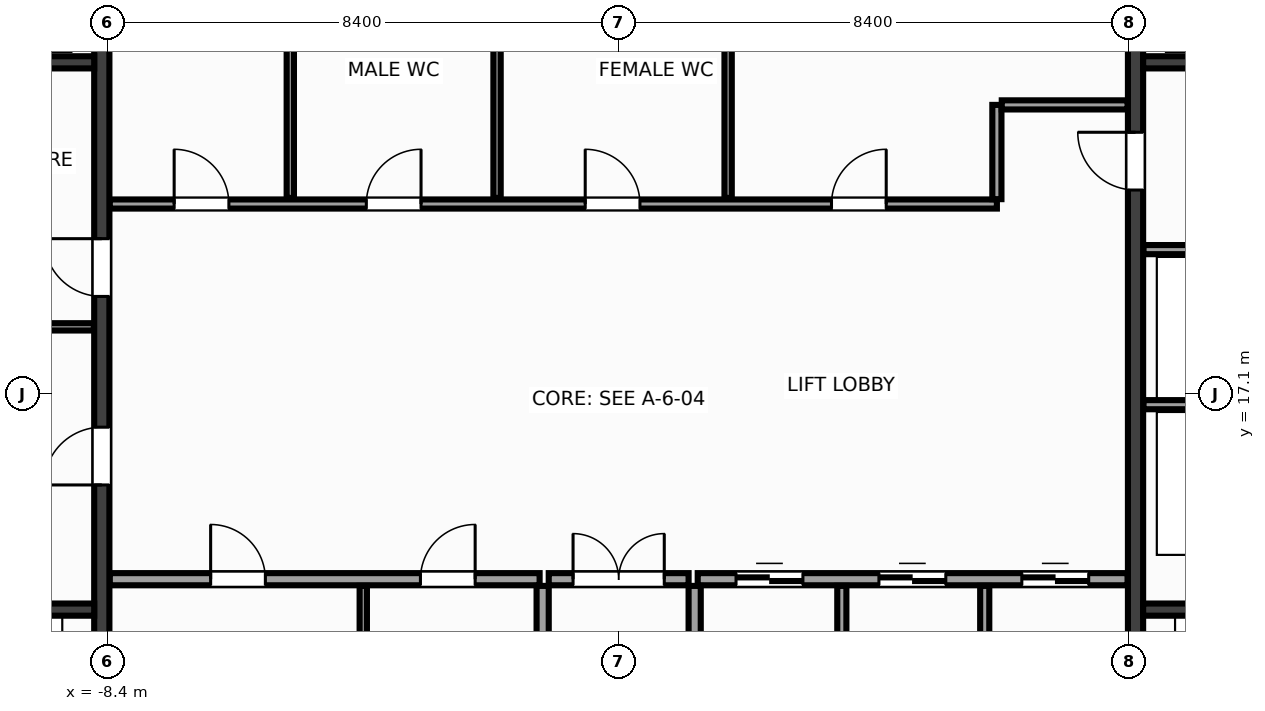
"""IFC4 building model, lengths in metres.
Left out: names, types, materials, properties, quantities, classifications, styles, units other than length and angle.
Written with IfcOpenShell. Run it as: python <this file> out.ifc"""

import sys

from ifc_helpers import new_model, si_unit, direction, frame, frame_2d, origin, place, context, subcontext, project, spatial, rectangle, extrude, source, transform, mapped, element, fill, save


model = new_model("IFC4")
c1 = context("Model", 3, precision=1e-05, world=origin(), true_north=direction((0.0, 1.0)))
c2 = subcontext(c1, "Body", "Model", "MODEL_VIEW")
j1 = project(units=[si_unit("LENGTHUNIT", "METRE"), si_unit("PLANEANGLEUNIT", "RADIAN")], contexts=[c1])
p1 = place(None, origin())
s1 = spatial("IfcSite", under=j1, at=p1, CompositionType="ELEMENT")
p2 = place(p1, origin())
s2 = spatial("IfcBuilding", under=s1, at=p2, CompositionType="ELEMENT")
p3 = place(p2, frame((0.0, 0.0, 113.6)))
s3 = spatial("IfcBuildingStorey", under=s2, at=p3, CompositionType="ELEMENT", Elevation=113.6)
m1 = source(origin(), c2, "Body", "SweptSolid", [
    extrude(rectangle(XDim=12.95, YDim=0.25, at=frame_2d((6.475, 0.0))), origin(), (0.0, 0.0, 1.0), 3.6),
])
p4 = place(p3, frame((-8.5, 10.525, 0.0), z_axis=(0.0, 0.0, 1.0), x_axis=(0.0, 1.0, 0.0)))
e1 = element("IfcWall", 1, at=p4, inside=s3, PredefinedType="SHEAR", context=c2, shape_type="MappedRepresentation", body=[
    mapped(m1, transform((0.0, 0.0, 0.0), x_axis=(1.0, 0.0, 0.0), y_axis=(0.0, 1.0, 0.0), z_axis=(0.0, 0.0, 1.0), scale=1.0)),
])
p5 = place(p4, frame((5.075, 0.0, 0.0)))
e2 = element("IfcOpeningElement", 2, at=p5, cuts=e1, PredefinedType="OPENING", context=c2, shape_type="SweptSolid", body=[
    extrude(rectangle(XDim=0.95, YDim=2.15, at=frame_2d((0.475, 1.075))), frame((0.0, 0.137, 0.0), z_axis=(0.0, -1.0, 0.0), x_axis=(1.0, 0.0, 0.0)), (0.0, 0.0, 1.0), 0.274),
])
p6 = place(p4, frame((8.175, 0.0, 0.0)))
e3 = element("IfcOpeningElement", 3, at=p6, cuts=e1, PredefinedType="OPENING", context=c2, shape_type="SweptSolid", body=[
    extrude(rectangle(XDim=0.95, YDim=2.15, at=frame_2d((0.475, 1.075))), frame((0.0, 0.137, 0.0), z_axis=(0.0, -1.0, 0.0), x_axis=(1.0, 0.0, 0.0)), (0.0, 0.0, 1.0), 0.274),
])
p7 = place(p3, frame((8.5, 10.525, 0.0), z_axis=(0.0, 0.0, 1.0), x_axis=(0.0, 1.0, 0.0)))
e4 = element("IfcWall", 4, at=p7, inside=s3, PredefinedType="SHEAR", context=c2, shape_type="MappedRepresentation", body=[
    mapped(m1, transform((0.0, 0.0, 0.0), x_axis=(1.0, 0.0, 0.0), y_axis=(0.0, 1.0, 0.0), z_axis=(0.0, 0.0, 1.0), scale=1.0)),
])
p8 = place(p7, frame((9.925, 0.0, 0.0)))
e5 = element("IfcOpeningElement", 5, at=p8, cuts=e4, PredefinedType="OPENING", context=c2, shape_type="SweptSolid", body=[
    extrude(rectangle(XDim=0.95, YDim=2.15, at=frame_2d((0.475, 1.075))), frame((0.0, 0.137, 0.0), z_axis=(0.0, -1.0, 0.0), x_axis=(1.0, 0.0, 0.0)), (0.0, 0.0, 1.0), 0.274),
])
m2 = source(origin(), c2, "Body", "SweptSolid", [
    extrude(rectangle(XDim=2.825, YDim=0.2, at=frame_2d((1.413, 0.0))), origin(), (0.0, 0.0, 1.0), 3.6),
])
for number, where, z_axis, x_axis in (
    (6, (-11.45, 13.55, 0.0), (0.0, 0.0, 1.0), (1.0, 0.0, 0.0)),
    (7, (8.625, 13.55, 0.0), (0.0, 0.0, 1.0), (1.0, 0.0, 0.0)),
):
    element("IfcWall", number, at=place(p3, frame(where, z_axis=z_axis, x_axis=x_axis)), inside=s3, PredefinedType="SHEAR", context=c2, shape_type="MappedRepresentation", body=[
        mapped(m2, transform((0.0, 0.0, 0.0), x_axis=(1.0, 0.0, 0.0), y_axis=(0.0, 1.0, 0.0), z_axis=(0.0, 0.0, 1.0), scale=1.0)),
    ])
m3 = source(origin(), c2, "Body", "SweptSolid", [
    extrude(rectangle(XDim=3.02, YDim=0.2, at=frame_2d((1.51, 0.0))), origin(), (0.0, 0.0, 1.0), 3.6),
])
for number, where, z_axis, x_axis in (
    (8, (-11.645, 22.55, 0.0), (0.0, 0.0, 1.0), (1.0, 0.0, 0.0)),
    (9, (8.625, 22.55, 0.0), (0.0, 0.0, 1.0), (1.0, 0.0, 0.0)),
):
    element("IfcWall", number, at=place(p3, frame(where, z_axis=z_axis, x_axis=x_axis)), inside=s3, PredefinedType="SHEAR", context=c2, shape_type="MappedRepresentation", body=[
        mapped(m3, transform((0.0, 0.0, 0.0), x_axis=(1.0, 0.0, 0.0), y_axis=(0.0, 1.0, 0.0), z_axis=(0.0, 0.0, 1.0), scale=1.0)),
    ])
m4 = source(origin(), c2, "Body", "SweptSolid", [
    extrude(rectangle(XDim=3.01, YDim=0.12, at=frame_2d((1.505, 0.0))), origin(), (0.0, 0.0, 1.0), 3.36),
])
p9 = place(p3, frame((-11.64, 18.2, 0.0), z_axis=(0.0, 0.0, 1.0), x_axis=(1.0, 0.0, 0.0)))
e10 = element("IfcWall", 10, at=p9, inside=s3, PredefinedType="PARTITIONING", context=c2, shape_type="MappedRepresentation", body=[
    mapped(m4, transform((0.0, 0.0, 0.0), x_axis=(1.0, 0.0, 0.0), y_axis=(0.0, 1.0, 0.0), z_axis=(0.0, 0.0, 1.0), scale=1.0)),
])
m5 = source(origin(), c2, "Body", "SweptSolid", [
    extrude(rectangle(XDim=3.01, YDim=0.15, at=frame_2d((1.505, 0.0))), origin(), (0.0, 0.0, 1.0), 3.36),
])
for number, where, z_axis, x_axis in (
    (11, (8.63, 16.92, 0.0), (0.0, 0.0, 1.0), (1.0, 0.0, 0.0)),
    (12, (8.63, 19.47, 0.0), (0.0, 0.0, 1.0), (1.0, 0.0, 0.0)),
):
    element("IfcWall", number, at=place(p3, frame(where, z_axis=z_axis, x_axis=x_axis)), inside=s3, PredefinedType="PARTITIONING", context=c2, shape_type="MappedRepresentation", body=[
        mapped(m5, transform((0.0, 0.0, 0.0), x_axis=(1.0, 0.0, 0.0), y_axis=(0.0, 1.0, 0.0), z_axis=(0.0, 0.0, 1.0), scale=1.0)),
    ])
m6 = source(origin(), c2, "Body", "SweptSolid", [
    extrude(rectangle(XDim=7.07, YDim=0.2, at=frame_2d((3.535, 0.0))), origin(), (0.0, 0.0, 1.0), 3.36),
])
p10 = place(p3, frame((-8.37, 14.05, 0.0), z_axis=(0.0, 0.0, 1.0), x_axis=(1.0, 0.0, 0.0)))
e13 = element("IfcWall", 13, at=p10, inside=s3, PredefinedType="PARTITIONING", context=c2, shape_type="MappedRepresentation", body=[
    mapped(m6, transform((0.0, 0.0, 0.0), x_axis=(1.0, 0.0, 0.0), y_axis=(0.0, 1.0, 0.0), z_axis=(0.0, 0.0, 1.0), scale=1.0)),
])
p11 = place(p10, frame((1.66, 0.0, 0.0)))
e14 = element("IfcOpeningElement", 14, at=p11, cuts=e13, PredefinedType="OPENING", context=c2, shape_type="SweptSolid", body=[
    extrude(rectangle(XDim=0.9, YDim=2.15, at=frame_2d((0.45, 1.075))), frame((0.0, 0.112, 0.0), z_axis=(0.0, -1.0, 0.0), x_axis=(1.0, 0.0, 0.0)), (0.0, 0.0, 1.0), 0.224),
])
p12 = place(p10, frame((5.11, 0.0, 0.0)))
e15 = element("IfcOpeningElement", 15, at=p12, cuts=e13, PredefinedType="OPENING", context=c2, shape_type="SweptSolid", body=[
    extrude(rectangle(XDim=0.9, YDim=2.15, at=frame_2d((0.45, 1.075))), frame((0.0, 0.112, 0.0), z_axis=(0.0, -1.0, 0.0), x_axis=(1.0, 0.0, 0.0)), (0.0, 0.0, 1.0), 0.224),
])
p13 = place(p3, frame((1.3, 14.05, 0.0), z_axis=(0.0, 0.0, 1.0), x_axis=(1.0, 0.0, 0.0)))
e16 = element("IfcWall", 16, at=p13, inside=s3, PredefinedType="PARTITIONING", context=c2, shape_type="MappedRepresentation", body=[
    mapped(m6, transform((0.0, 0.0, 0.0), x_axis=(1.0, 0.0, 0.0), y_axis=(0.0, 1.0, 0.0), z_axis=(0.0, 0.0, 1.0), scale=1.0)),
])
p14 = place(p13, frame((0.63, 0.0, 0.0)))
e17 = element("IfcOpeningElement", 17, at=p14, cuts=e16, PredefinedType="OPENING", context=c2, shape_type="SweptSolid", body=[
    extrude(rectangle(XDim=1.1, YDim=2.15, at=frame_2d((0.55, 1.075))), frame((0.0, 0.112, 0.0), z_axis=(0.0, -1.0, 0.0), x_axis=(1.0, 0.0, 0.0)), (0.0, 0.0, 1.0), 0.224),
])
p15 = place(p13, frame((2.98, 0.0, 0.0)))
e18 = element("IfcOpeningElement", 18, at=p15, cuts=e16, PredefinedType="OPENING", context=c2, shape_type="SweptSolid", body=[
    extrude(rectangle(XDim=1.1, YDim=2.15, at=frame_2d((0.55, 1.075))), frame((0.0, 0.112, 0.0), z_axis=(0.0, -1.0, 0.0), x_axis=(1.0, 0.0, 0.0)), (0.0, 0.0, 1.0), 0.224),
])
p16 = place(p13, frame((5.33, 0.0, 0.0)))
e19 = element("IfcOpeningElement", 19, at=p16, cuts=e16, PredefinedType="OPENING", context=c2, shape_type="SweptSolid", body=[
    extrude(rectangle(XDim=1.1, YDim=2.15, at=frame_2d((0.55, 1.075))), frame((0.0, 0.112, 0.0), z_axis=(0.0, -1.0, 0.0), x_axis=(1.0, 0.0, 0.0)), (0.0, 0.0, 1.0), 0.224),
])
m7 = source(origin(), c2, "Body", "SweptSolid", [
    extrude(rectangle(XDim=3.415, YDim=0.2, at=frame_2d((1.708, 0.0))), origin(), (0.0, 0.0, 1.0), 3.36),
])
for number, where, z_axis, x_axis in (
    (20, (-1.25, 10.525, 0.0), (0.0, 0.0, 1.0), (0.0, 1.0, 0.0)),
    (21, (1.25, 10.525, 0.0), (0.0, 0.0, 1.0), (0.0, 1.0, 0.0)),
):
    element("IfcWall", number, at=place(p3, frame(where, z_axis=z_axis, x_axis=x_axis)), inside=s3, PredefinedType="PARTITIONING", context=c2, shape_type="MappedRepresentation", body=[
        mapped(m7, transform((0.0, 0.0, 0.0), x_axis=(1.0, 0.0, 0.0), y_axis=(0.0, 1.0, 0.0), z_axis=(0.0, 0.0, 1.0), scale=1.0)),
    ])
m8 = source(origin(), c2, "Body", "SweptSolid", [
    extrude(rectangle(XDim=2.3, YDim=0.2, at=frame_2d((1.15, 0.0))), origin(), (0.0, 0.0, 1.0), 3.36),
])
p17 = place(p3, frame((-1.15, 14.05, 0.0), z_axis=(0.0, 0.0, 1.0), x_axis=(1.0, 0.0, 0.0)))
e22 = element("IfcWall", 22, at=p17, inside=s3, PredefinedType="PARTITIONING", context=c2, shape_type="MappedRepresentation", body=[
    mapped(m8, transform((0.0, 0.0, 0.0), x_axis=(1.0, 0.0, 0.0), y_axis=(0.0, 1.0, 0.0), z_axis=(0.0, 0.0, 1.0), scale=1.0)),
])
p18 = place(p17, frame((0.4, 0.0, 0.0)))
e23 = element("IfcOpeningElement", 23, at=p18, cuts=e22, PredefinedType="OPENING", context=c2, shape_type="SweptSolid", body=[
    extrude(rectangle(XDim=1.5, YDim=2.2, at=frame_2d((0.75, 1.1))), frame((0.0, 0.112, 0.0), z_axis=(0.0, -1.0, 0.0), x_axis=(1.0, 0.0, 0.0)), (0.0, 0.0, 1.0), 0.224),
])
m9 = source(origin(), c2, "Body", "SweptSolid", [
    extrude(rectangle(XDim=14.59, YDim=0.15, at=frame_2d((7.295, 0.0))), origin(), (0.0, 0.0, 1.0), 3.36),
])
p19 = place(p3, frame((-8.37, 20.22, 0.0), z_axis=(0.0, 0.0, 1.0), x_axis=(1.0, 0.0, 0.0)))
e24 = element("IfcWall", 24, at=p19, inside=s3, PredefinedType="PARTITIONING", context=c2, shape_type="MappedRepresentation", body=[
    mapped(m9, transform((0.0, 0.0, 0.0), x_axis=(1.0, 0.0, 0.0), y_axis=(0.0, 1.0, 0.0), z_axis=(0.0, 0.0, 1.0), scale=1.0)),
])
p20 = place(p19, frame((1.06, 0.0, 0.0)))
e25 = element("IfcOpeningElement", 25, at=p20, cuts=e24, PredefinedType="OPENING", context=c2, shape_type="SweptSolid", body=[
    extrude(rectangle(XDim=0.9, YDim=2.15, at=frame_2d((0.45, 1.075))), frame((0.0, 0.087, 0.0), z_axis=(0.0, -1.0, 0.0), x_axis=(1.0, 0.0, 0.0)), (0.0, 0.0, 1.0), 0.174),
])
p21 = place(p19, frame((4.22, 0.0, 0.0)))
e26 = element("IfcOpeningElement", 26, at=p21, cuts=e24, PredefinedType="OPENING", context=c2, shape_type="SweptSolid", body=[
    extrude(rectangle(XDim=0.9, YDim=2.15, at=frame_2d((0.45, 1.075))), frame((0.0, 0.087, 0.0), z_axis=(0.0, -1.0, 0.0), x_axis=(1.0, 0.0, 0.0)), (0.0, 0.0, 1.0), 0.174),
])
p22 = place(p19, frame((7.82, 0.0, 0.0)))
e27 = element("IfcOpeningElement", 27, at=p22, cuts=e24, PredefinedType="OPENING", context=c2, shape_type="SweptSolid", body=[
    extrude(rectangle(XDim=0.9, YDim=2.15, at=frame_2d((0.45, 1.075))), frame((0.0, 0.087, 0.0), z_axis=(0.0, -1.0, 0.0), x_axis=(1.0, 0.0, 0.0)), (0.0, 0.0, 1.0), 0.174),
])
p23 = place(p19, frame((11.87, 0.0, 0.0)))
e28 = element("IfcOpeningElement", 28, at=p23, cuts=e24, PredefinedType="OPENING", context=c2, shape_type="SweptSolid", body=[
    extrude(rectangle(XDim=0.9, YDim=2.15, at=frame_2d((0.45, 1.075))), frame((0.0, 0.087, 0.0), z_axis=(0.0, -1.0, 0.0), x_axis=(1.0, 0.0, 0.0)), (0.0, 0.0, 1.0), 0.174),
])
m10 = source(origin(), c2, "Body", "SweptSolid", [
    extrude(rectangle(XDim=1.55, YDim=0.15, at=frame_2d((0.775, 0.0))), origin(), (0.0, 0.0, 1.0), 3.36),
])
p24 = place(p3, frame((6.22, 20.3, 0.0), z_axis=(0.0, 0.0, 1.0), x_axis=(0.0, 1.0, 0.0)))
e29 = element("IfcWall", 29, at=p24, inside=s3, PredefinedType="PARTITIONING", context=c2, shape_type="MappedRepresentation", body=[
    mapped(m10, transform((0.0, 0.0, 0.0), x_axis=(1.0, 0.0, 0.0), y_axis=(0.0, 1.0, 0.0), z_axis=(0.0, 0.0, 1.0), scale=1.0)),
])
m11 = source(origin(), c2, "Body", "SweptSolid", [
    extrude(rectangle(XDim=2.07, YDim=0.15, at=frame_2d((1.035, 0.0))), origin(), (0.0, 0.0, 1.0), 3.36),
])
p25 = place(p3, frame((6.3, 21.85, 0.0), z_axis=(0.0, 0.0, 1.0), x_axis=(1.0, 0.0, 0.0)))
e30 = element("IfcWall", 30, at=p25, inside=s3, PredefinedType="PARTITIONING", context=c2, shape_type="MappedRepresentation", body=[
    mapped(m11, transform((0.0, 0.0, 0.0), x_axis=(1.0, 0.0, 0.0), y_axis=(0.0, 1.0, 0.0), z_axis=(0.0, 0.0, 1.0), scale=1.0)),
])
m12 = source(origin(), c2, "Body", "SweptSolid", [
    extrude(rectangle(XDim=3.415, YDim=0.12, at=frame_2d((1.708, 0.0))), origin(), (0.0, 0.0, 1.0), 3.36),
])
p26 = place(p3, frame((-4.2, 10.525, 0.0), z_axis=(0.0, 0.0, 1.0), x_axis=(0.0, 1.0, 0.0)))
e31 = element("IfcWall", 31, at=p26, inside=s3, PredefinedType="PARTITIONING", context=c2, shape_type="MappedRepresentation", body=[
    mapped(m12, transform((0.0, 0.0, 0.0), x_axis=(1.0, 0.0, 0.0), y_axis=(0.0, 1.0, 0.0), z_axis=(0.0, 0.0, 1.0), scale=1.0)),
])
m13 = source(origin(), c2, "Body", "SweptSolid", [
    extrude(rectangle(XDim=3.415, YDim=0.15, at=frame_2d((1.708, 0.0))), origin(), (0.0, 0.0, 1.0), 3.36),
])
for number, where, z_axis, x_axis in (
    (32, (3.67, 10.525, 0.0), (0.0, 0.0, 1.0), (0.0, 1.0, 0.0)),
    (33, (6.02, 10.525, 0.0), (0.0, 0.0, 1.0), (0.0, 1.0, 0.0)),
):
    element("IfcWall", number, at=place(p3, frame(where, z_axis=z_axis, x_axis=x_axis)), inside=s3, PredefinedType="PARTITIONING", context=c2, shape_type="MappedRepresentation", body=[
        mapped(m13, transform((0.0, 0.0, 0.0), x_axis=(1.0, 0.0, 0.0), y_axis=(0.0, 1.0, 0.0), z_axis=(0.0, 0.0, 1.0), scale=1.0)),
    ])
m14 = source(origin(), c2, "Body", "SweptSolid", [
    extrude(rectangle(XDim=3.115, YDim=0.12, at=frame_2d((1.558, 0.0))), origin(), (0.0, 0.0, 1.0), 3.36),
])
for number, where, z_axis, x_axis in (
    (34, (-5.4, 20.32, 0.0), (0.0, 0.0, 1.0), (0.0, 1.0, 0.0)),
    (35, (-2.0, 20.32, 0.0), (0.0, 0.0, 1.0), (0.0, 1.0, 0.0)),
    (36, (1.8, 20.32, 0.0), (0.0, 0.0, 1.0), (0.0, 1.0, 0.0)),
):
    element("IfcWall", number, at=place(p3, frame(where, z_axis=z_axis, x_axis=x_axis)), inside=s3, PredefinedType="PARTITIONING", context=c2, shape_type="MappedRepresentation", body=[
        mapped(m14, transform((0.0, 0.0, 0.0), x_axis=(1.0, 0.0, 0.0), y_axis=(0.0, 1.0, 0.0), z_axis=(0.0, 0.0, 1.0), scale=1.0)),
    ])
m15 = source(origin(), c2, "Body", "SweptSolid", [
    extrude(rectangle(XDim=0.95, YDim=2.15, at=frame_2d((0.475, 1.075))), frame((0.0, 0.025, 0.0), z_axis=(0.0, -1.0, 0.0), x_axis=(1.0, 0.0, 0.0)), (0.0, 0.0, 1.0), 0.05),
])
p27 = place(p5, origin())
e37 = element("IfcDoor", 37, at=p27, inside=s3, OperationType="SINGLE_SWING_LEFT", PredefinedType="DOOR", context=c2, shape_type="MappedRepresentation", body=[
    mapped(m15, transform((0.0, 0.0, 0.0), x_axis=(1.0, 0.0, 0.0), y_axis=(0.0, 1.0, 0.0), z_axis=(0.0, 0.0, 1.0), scale=1.0)),
])
fill(e2, e37)
p28 = place(p6, origin())
e38 = element("IfcDoor", 38, at=p28, inside=s3, OperationType="SINGLE_SWING_RIGHT", PredefinedType="DOOR", context=c2, shape_type="MappedRepresentation", body=[
    mapped(m15, transform((0.0, 0.0, 0.0), x_axis=(1.0, 0.0, 0.0), y_axis=(0.0, 1.0, 0.0), z_axis=(0.0, 0.0, 1.0), scale=1.0)),
])
fill(e3, e38)
m16 = source(origin(), c2, "Body", "SweptSolid", [
    extrude(rectangle(XDim=0.95, YDim=2.15, at=frame_2d((0.475, 1.075))), frame((0.0, 0.025, 0.0), z_axis=(0.0, -1.0, 0.0), x_axis=(1.0, 0.0, 0.0)), (0.0, 0.0, 1.0), 0.05),
])
p29 = place(p8, origin())
e39 = element("IfcDoor", 39, at=p29, inside=s3, OperationType="SINGLE_SWING_RIGHT", PredefinedType="DOOR", context=c2, shape_type="MappedRepresentation", body=[
    mapped(m16, transform((0.0, 0.0, 0.0), x_axis=(1.0, 0.0, 0.0), y_axis=(0.0, 1.0, 0.0), z_axis=(0.0, 0.0, 1.0), scale=1.0)),
])
fill(e5, e39)
m17 = source(origin(), c2, "Body", "SweptSolid", [
    extrude(rectangle(XDim=0.9, YDim=2.15, at=frame_2d((0.45, 1.075))), frame((0.0, 0.025, 0.0), z_axis=(0.0, -1.0, 0.0), x_axis=(1.0, 0.0, 0.0)), (0.0, 0.0, 1.0), 0.05),
])
p30 = place(p11, origin())
e40 = element("IfcDoor", 40, at=p30, inside=s3, OperationType="SINGLE_SWING_LEFT", PredefinedType="DOOR", context=c2, shape_type="MappedRepresentation", body=[
    mapped(m17, transform((0.0, 0.0, 0.0), x_axis=(1.0, 0.0, 0.0), y_axis=(0.0, 1.0, 0.0), z_axis=(0.0, 0.0, 1.0), scale=1.0)),
])
fill(e14, e40)
p31 = place(p12, origin())
e41 = element("IfcDoor", 41, at=p31, inside=s3, OperationType="SINGLE_SWING_RIGHT", PredefinedType="DOOR", context=c2, shape_type="MappedRepresentation", body=[
    mapped(m17, transform((0.0, 0.0, 0.0), x_axis=(1.0, 0.0, 0.0), y_axis=(0.0, 1.0, 0.0), z_axis=(0.0, 0.0, 1.0), scale=1.0)),
])
fill(e15, e41)
m18 = source(origin(), c2, "Body", "SweptSolid", [
    extrude(rectangle(XDim=1.1, YDim=2.15, at=frame_2d((0.55, 1.075))), frame((0.0, 0.025, 0.0), z_axis=(0.0, -1.0, 0.0), x_axis=(1.0, 0.0, 0.0)), (0.0, 0.0, 1.0), 0.05),
])
p32 = place(p14, origin())
e42 = element("IfcDoor", 42, at=p32, inside=s3, OperationType="DOUBLE_DOOR_SLIDING", PredefinedType="DOOR", context=c2, shape_type="MappedRepresentation", body=[
    mapped(m18, transform((0.0, 0.0, 0.0), x_axis=(1.0, 0.0, 0.0), y_axis=(0.0, 1.0, 0.0), z_axis=(0.0, 0.0, 1.0), scale=1.0)),
])
fill(e17, e42)
p33 = place(p15, origin())
e43 = element("IfcDoor", 43, at=p33, inside=s3, OperationType="DOUBLE_DOOR_SLIDING", PredefinedType="DOOR", context=c2, shape_type="MappedRepresentation", body=[
    mapped(m18, transform((0.0, 0.0, 0.0), x_axis=(1.0, 0.0, 0.0), y_axis=(0.0, 1.0, 0.0), z_axis=(0.0, 0.0, 1.0), scale=1.0)),
])
fill(e18, e43)
p34 = place(p16, origin())
e44 = element("IfcDoor", 44, at=p34, inside=s3, OperationType="DOUBLE_DOOR_SLIDING", PredefinedType="DOOR", context=c2, shape_type="MappedRepresentation", body=[
    mapped(m18, transform((0.0, 0.0, 0.0), x_axis=(1.0, 0.0, 0.0), y_axis=(0.0, 1.0, 0.0), z_axis=(0.0, 0.0, 1.0), scale=1.0)),
])
fill(e19, e44)
m19 = source(origin(), c2, "Body", "SweptSolid", [
    extrude(rectangle(XDim=1.5, YDim=2.2, at=frame_2d((0.75, 1.1))), frame((0.0, 0.025, 0.0), z_axis=(0.0, -1.0, 0.0), x_axis=(1.0, 0.0, 0.0)), (0.0, 0.0, 1.0), 0.05),
])
p35 = place(p18, origin())
e45 = element("IfcDoor", 45, at=p35, inside=s3, OperationType="DOUBLE_DOOR_SINGLE_SWING", PredefinedType="DOOR", context=c2, shape_type="MappedRepresentation", body=[
    mapped(m19, transform((0.0, 0.0, 0.0), x_axis=(1.0, 0.0, 0.0), y_axis=(0.0, 1.0, 0.0), z_axis=(0.0, 0.0, 1.0), scale=1.0)),
])
fill(e23, e45)
p36 = place(p20, origin())
e46 = element("IfcDoor", 46, at=p36, inside=s3, OperationType="SINGLE_SWING_LEFT", PredefinedType="DOOR", context=c2, shape_type="MappedRepresentation", body=[
    mapped(m17, transform((0.0, 0.0, 0.0), x_axis=(1.0, 0.0, 0.0), y_axis=(0.0, 1.0, 0.0), z_axis=(0.0, 0.0, 1.0), scale=1.0)),
])
fill(e25, e46)
p37 = place(p21, origin())
e47 = element("IfcDoor", 47, at=p37, inside=s3, OperationType="SINGLE_SWING_RIGHT", PredefinedType="DOOR", context=c2, shape_type="MappedRepresentation", body=[
    mapped(m17, transform((0.0, 0.0, 0.0), x_axis=(1.0, 0.0, 0.0), y_axis=(0.0, 1.0, 0.0), z_axis=(0.0, 0.0, 1.0), scale=1.0)),
])
fill(e26, e47)
p38 = place(p22, origin())
e48 = element("IfcDoor", 48, at=p38, inside=s3, OperationType="SINGLE_SWING_LEFT", PredefinedType="DOOR", context=c2, shape_type="MappedRepresentation", body=[
    mapped(m17, transform((0.0, 0.0, 0.0), x_axis=(1.0, 0.0, 0.0), y_axis=(0.0, 1.0, 0.0), z_axis=(0.0, 0.0, 1.0), scale=1.0)),
])
fill(e27, e48)
p39 = place(p23, origin())
e49 = element("IfcDoor", 49, at=p39, inside=s3, OperationType="SINGLE_SWING_RIGHT", PredefinedType="DOOR", context=c2, shape_type="MappedRepresentation", body=[
    mapped(m17, transform((0.0, 0.0, 0.0), x_axis=(1.0, 0.0, 0.0), y_axis=(0.0, 1.0, 0.0), z_axis=(0.0, 0.0, 1.0), scale=1.0)),
])
fill(e28, e49)
save(model, sys.argv[1])
